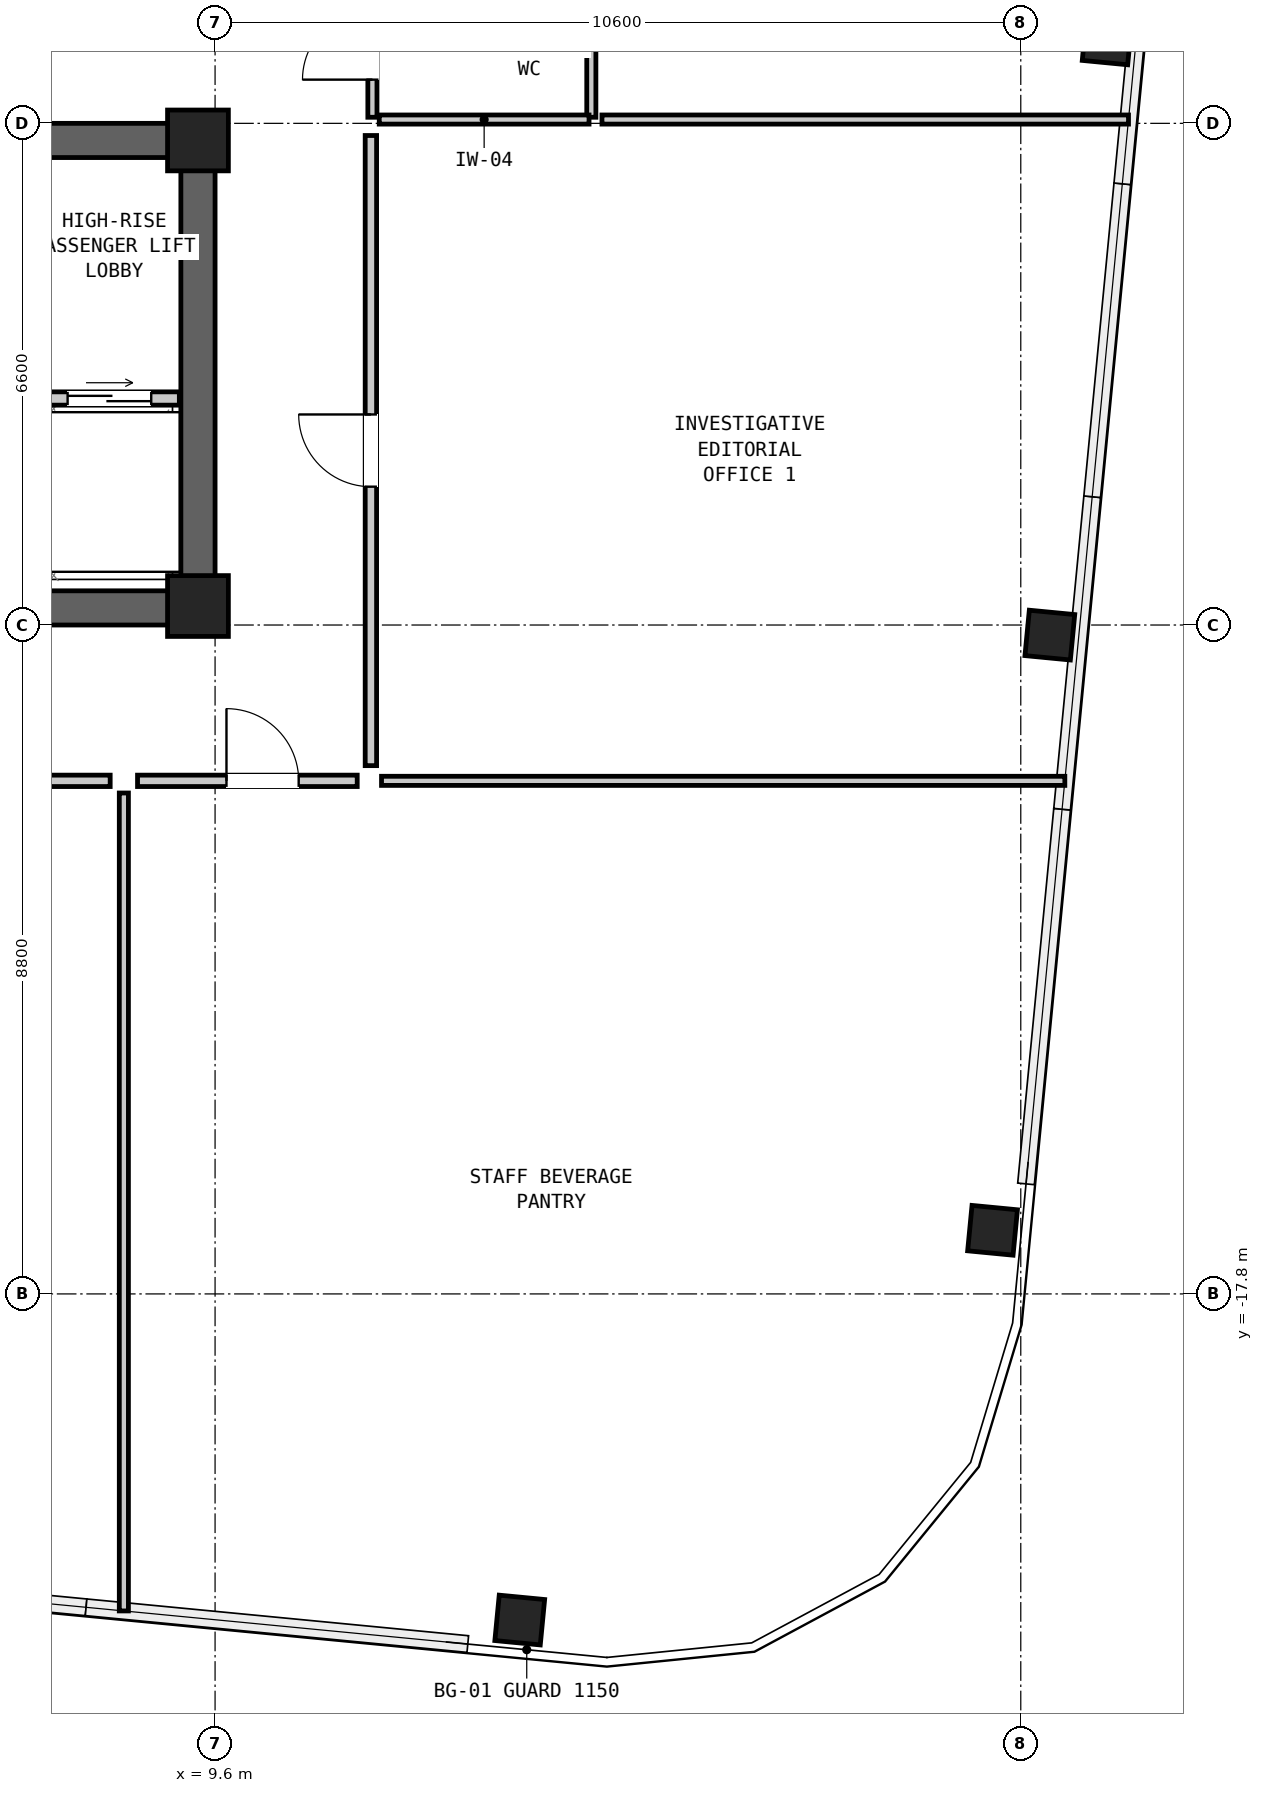
"""IFC4 building model, lengths in metres.
Left out: names, types, materials, properties, quantities, classifications, styles, units other than length and angle.
Written with IfcOpenShell. Run it as: python <this file> out.ifc"""

import sys

from ifc_helpers import new_model, si_unit, direction, frame, frame_2d, origin, origin_2d, place, context, subcontext, project, spatial, rectangle, hollow_rectangle, extrude, element, fill, save


model = new_model("IFC4")
c1 = context("Model", 3, precision=1e-05, world=origin(), true_north=direction((0.0, 1.0)))
c2 = subcontext(c1, "Body", "Model", "MODEL_VIEW")
j1 = project(units=[si_unit("LENGTHUNIT", "METRE"), si_unit("PLANEANGLEUNIT", "RADIAN")], contexts=[c1])
p1 = place(None, origin())
s1 = spatial("IfcSite", under=j1, at=p1, CompositionType="ELEMENT")
p2 = place(p1, origin())
s2 = spatial("IfcBuilding", under=s1, at=p2, CompositionType="ELEMENT")
p3 = place(p2, frame((0.0, 0.0, 252.0)))
s3 = spatial("IfcBuildingStorey", under=s2, at=p3, CompositionType="ELEMENT", Elevation=252.0)
p4 = place(p3, frame((-9.6, -8.775, 0.0), z_axis=(0.0, 0.0, 1.0), x_axis=(1.0, 0.0, 0.0)))
e1 = element("IfcWall", 1, at=p4, inside=s3, PredefinedType="SHEAR", context=c2, shape_type="SweptSolid", body=[
    extrude(rectangle(XDim=19.2, YDim=0.45, at=frame_2d((9.6, 0.0))), origin(), (0.0, 0.0, 1.0), 3.05),
])
p5 = place(p3, frame((-9.6, -2.625, 0.0), z_axis=(0.0, 0.0, 1.0), x_axis=(1.0, 0.0, 0.0)))
e2 = element("IfcWall", 2, at=p5, inside=s3, PredefinedType="SHEAR", context=c2, shape_type="SweptSolid", body=[
    extrude(rectangle(XDim=19.2, YDim=0.45, at=frame_2d((9.6, 0.0))), origin(), (0.0, 0.0, 1.0), 3.05),
])
p6 = place(p5, frame((3.8, 0.0, 0.0)))
e3 = element("IfcOpeningElement", 3, at=p6, cuts=e2, PredefinedType="OPENING", context=c2, shape_type="SweptSolid", body=[
    extrude(rectangle(XDim=1.1, YDim=2.08, at=frame_2d((0.55, 1.04))), frame((0.0, 0.237, 0.0), z_axis=(0.0, -1.0, 0.0), x_axis=(1.0, 0.0, 0.0)), (0.0, 0.0, 1.0), 0.474),
])
p7 = place(p5, frame((10.8, 0.0, 0.0)))
e4 = element("IfcOpeningElement", 4, at=p7, cuts=e2, PredefinedType="OPENING", context=c2, shape_type="SweptSolid", body=[
    extrude(rectangle(XDim=0.95, YDim=2.1, at=frame_2d((0.475, 1.05))), frame((0.0, 0.237, 0.0), z_axis=(0.0, -1.0, 0.0), x_axis=(1.0, 0.0, 0.0)), (0.0, 0.0, 1.0), 0.474),
])
p8 = place(p5, frame((14.8, 0.0, 0.0)))
e5 = element("IfcOpeningElement", 5, at=p8, cuts=e2, PredefinedType="OPENING", context=c2, shape_type="SweptSolid", body=[
    extrude(rectangle(XDim=1.6, YDim=2.12, at=frame_2d((0.8, 1.06))), frame((0.0, 0.237, 0.0), z_axis=(0.0, -1.0, 0.0), x_axis=(1.0, 0.0, 0.0)), (0.0, 0.0, 1.0), 0.474),
])
p9 = place(p3, frame((9.375, -9.0, 0.0), z_axis=(0.0, 0.0, 1.0), x_axis=(0.0, 1.0, 0.0)))
e6 = element("IfcWall", 6, at=p9, inside=s3, PredefinedType="SHEAR", context=c2, shape_type="SweptSolid", body=[
    extrude(rectangle(XDim=6.6, YDim=0.45, at=frame_2d((3.3, 0.0))), origin(), (0.0, 0.0, 1.0), 3.05),
])
for number, where, z_axis, x_axis in (
    (7, (13.608, -22.09, 0.0), (0.0, 0.0, 1.0), (0.995, -0.096, 0.0)),
    (8, (19.829, -16.963, 0.0), (0.0, 0.0, 1.0), (0.096, 0.995, 0.0)),
    (9, (20.583, -9.133, 0.0), (0.0, 0.0, 1.0), (0.096, 0.995, 0.0)),
    (10, (21.336, -1.302, 0.0), (0.0, 0.0, 1.0), (0.096, 0.995, 0.0)),
):
    element("IfcColumn", number, at=place(p3, frame(where, z_axis=z_axis, x_axis=x_axis)), inside=s3, PredefinedType="COLUMN", context=c2, shape_type="SweptSolid", body=[
        extrude(hollow_rectangle(XDim=0.6, YDim=0.6, WallThickness=0.04, at=origin_2d()), origin(), (0.0, 0.0, 1.0), 3.05),
    ])
for number, where, z_axis, x_axis in (
    (11, (9.375, -2.625, 0.0), (0.0, 0.0, 1.0), (1.0, 0.0, 0.0)),
    (12, (9.375, -8.75, 0.0), (0.0, 0.0, 1.0), (1.0, 0.0, 0.0)),
):
    element("IfcColumn", number, at=place(p3, frame(where, z_axis=z_axis, x_axis=x_axis)), inside=s3, PredefinedType="COLUMN", context=c2, shape_type="SweptSolid", body=[
        extrude(rectangle(XDim=0.8, YDim=0.8, at=origin_2d()), origin(), (0.0, 0.0, 1.0), 3.05),
    ])
p10 = place(p3, frame((4.0, -6.02, 0.0), z_axis=(0.0, 0.0, 1.0), x_axis=(1.0, 0.0, 0.0)))
e13 = element("IfcWall", 13, at=p10, inside=s3, PredefinedType="PARTITIONING", context=c2, shape_type="SweptSolid", body=[
    extrude(rectangle(XDim=5.13, YDim=0.175, at=frame_2d((2.565, 0.0))), origin(), (0.0, 0.0, 1.0), 2.86),
])
p11 = place(p10, frame((0.22, 0.0, 0.0)))
e14 = element("IfcOpeningElement", 14, at=p11, cuts=e13, PredefinedType="OPENING", context=c2, shape_type="SweptSolid", body=[
    extrude(rectangle(XDim=1.1, YDim=2.06, at=frame_2d((0.55, 1.03))), frame((0.0, 0.1, 0.0), z_axis=(0.0, -1.0, 0.0), x_axis=(1.0, 0.0, 0.0)), (0.0, 0.0, 1.0), 0.199),
])
p12 = place(p10, frame((1.94, 0.0, 0.0)))
e15 = element("IfcOpeningElement", 15, at=p12, cuts=e13, PredefinedType="OPENING", context=c2, shape_type="SweptSolid", body=[
    extrude(rectangle(XDim=1.1, YDim=2.06, at=frame_2d((0.55, 1.03))), frame((0.0, 0.1, 0.0), z_axis=(0.0, -1.0, 0.0), x_axis=(1.0, 0.0, 0.0)), (0.0, 0.0, 1.0), 0.199),
])
p13 = place(p10, frame((3.66, 0.0, 0.0)))
e16 = element("IfcOpeningElement", 16, at=p13, cuts=e13, PredefinedType="OPENING", context=c2, shape_type="SweptSolid", body=[
    extrude(rectangle(XDim=1.1, YDim=2.06, at=frame_2d((0.55, 1.03))), frame((0.0, 0.1, 0.0), z_axis=(0.0, -1.0, 0.0), x_axis=(1.0, 0.0, 0.0)), (0.0, 0.0, 1.0), 0.199),
])
p14 = place(p3, frame((11.67, -2.32, 0.0), z_axis=(0.0, 0.0, 1.0), x_axis=(0.0, 1.0, 0.0)))
e17 = element("IfcWall", 17, at=p14, inside=s3, PredefinedType="PARTITIONING", context=c2, shape_type="SweptSolid", body=[
    extrude(rectangle(XDim=1.94, YDim=0.12, at=frame_2d((0.97, 0.0))), origin(), (0.0, 0.0, 1.0), 2.86),
])
p15 = place(p14, frame((0.495, 0.0, 0.0)))
e18 = element("IfcOpeningElement", 18, at=p15, cuts=e17, PredefinedType="OPENING", context=c2, shape_type="SweptSolid", body=[
    extrude(rectangle(XDim=0.92, YDim=2.1, at=frame_2d((0.46, 1.05))), frame((0.0, 0.072, 0.0), z_axis=(0.0, -1.0, 0.0), x_axis=(1.0, 0.0, 0.0)), (0.0, 0.0, 1.0), 0.144),
])
p16 = place(p3, frame((14.55, -2.32, 0.0), z_axis=(0.0, 0.0, 1.0), x_axis=(0.0, 1.0, 0.0)))
e19 = element("IfcWall", 19, at=p16, inside=s3, PredefinedType="PARTITIONING", context=c2, shape_type="SweptSolid", body=[
    extrude(rectangle(XDim=5.93, YDim=0.12, at=frame_2d((2.965, 0.0))), origin(), (0.0, 0.0, 1.0), 2.86),
])
p17 = place(p3, frame((11.76, -2.35, 0.0), z_axis=(0.0, 0.0, 1.0), x_axis=(1.0, 0.0, 0.0)))
e20 = element("IfcWall", 20, at=p17, inside=s3, PredefinedType="PARTITIONING", context=c2, shape_type="SweptSolid", body=[
    extrude(rectangle(XDim=2.76, YDim=0.12, at=frame_2d((1.38, 0.0))), origin(), (0.0, 0.0, 1.0), 1.981),
])
p18 = place(p3, frame((11.79, -11.05, 0.0), z_axis=(0.0, 0.0, 1.0), x_axis=(1.0, 0.0, 0.0)))
e21 = element("IfcWall", 21, at=p18, inside=s3, PredefinedType="PARTITIONING", context=c2, shape_type="SweptSolid", body=[
    extrude(rectangle(XDim=8.99, YDim=0.12, at=frame_2d((4.495, 0.0))), origin(), (0.0, 0.0, 1.0), 2.86),
])
p19 = place(p3, frame((8.4, -21.971, 0.0), z_axis=(0.0, 0.0, 1.0), x_axis=(0.0, 1.0, 0.0)))
e22 = element("IfcWall", 22, at=p19, inside=s3, PredefinedType="PARTITIONING", context=c2, shape_type="SweptSolid", body=[
    extrude(rectangle(XDim=10.761, YDim=0.12, at=frame_2d((5.38, 0.0))), origin(), (0.0, 0.0, 1.0), 2.86),
])
p20 = place(p3, frame((14.69, -2.35, 0.0), z_axis=(0.0, 0.0, 1.0), x_axis=(1.0, 0.0, 0.0)))
e23 = element("IfcWall", 23, at=p20, inside=s3, PredefinedType="PARTITIONING", context=c2, shape_type="SweptSolid", body=[
    extrude(rectangle(XDim=6.927, YDim=0.12, at=frame_2d((3.464, 0.0))), origin(), (0.0, 0.0, 1.0), 1.981),
])
p21 = place(p3, frame((3.58, -11.05, 0.0), z_axis=(0.0, 0.0, 1.0), x_axis=(1.0, 0.0, 0.0)))
e24 = element("IfcWall", 24, at=p21, inside=s3, PredefinedType="PARTITIONING", context=c2, shape_type="SweptSolid", body=[
    extrude(rectangle(XDim=4.64, YDim=0.15, at=frame_2d((2.32, 0.0))), origin(), (0.0, 0.0, 1.0), 2.86),
])
p22 = place(p21, frame((1.845, 0.0, 0.0)))
e25 = element("IfcOpeningElement", 25, at=p22, cuts=e24, PredefinedType="OPENING", context=c2, shape_type="SweptSolid", body=[
    extrude(rectangle(XDim=0.95, YDim=2.1, at=frame_2d((0.475, 1.05))), frame((0.0, 0.087, 0.0), z_axis=(0.0, -1.0, 0.0), x_axis=(1.0, 0.0, 0.0)), (0.0, 0.0, 1.0), 0.174),
])
p23 = place(p3, frame((8.58, -11.05, 0.0), z_axis=(0.0, 0.0, 1.0), x_axis=(1.0, 0.0, 0.0)))
e26 = element("IfcWall", 26, at=p23, inside=s3, PredefinedType="PARTITIONING", context=c2, shape_type="SweptSolid", body=[
    extrude(rectangle(XDim=2.89, YDim=0.15, at=frame_2d((1.445, 0.0))), origin(), (0.0, 0.0, 1.0), 2.86),
])
p24 = place(p23, frame((1.17, 0.0, 0.0)))
e27 = element("IfcOpeningElement", 27, at=p24, cuts=e26, PredefinedType="OPENING", context=c2, shape_type="SweptSolid", body=[
    extrude(rectangle(XDim=0.95, YDim=2.1, at=frame_2d((0.475, 1.05))), frame((0.0, 0.087, 0.0), z_axis=(0.0, -1.0, 0.0), x_axis=(1.0, 0.0, 0.0)), (0.0, 0.0, 1.0), 0.174),
])
p25 = place(p3, frame((11.65, -10.85, 0.0), z_axis=(0.0, 0.0, 1.0), x_axis=(0.0, 1.0, 0.0)))
e28 = element("IfcWall", 28, at=p25, inside=s3, PredefinedType="PARTITIONING", context=c2, shape_type="SweptSolid", body=[
    extrude(rectangle(XDim=8.29, YDim=0.15, at=frame_2d((4.145, 0.0))), origin(), (0.0, 0.0, 1.0), 2.86),
])
p26 = place(p25, frame((3.67, 0.0, 0.0)))
e29 = element("IfcOpeningElement", 29, at=p26, cuts=e28, PredefinedType="OPENING", context=c2, shape_type="SweptSolid", body=[
    extrude(rectangle(XDim=0.95, YDim=2.1, at=frame_2d((0.475, 1.05))), frame((0.0, 0.087, 0.0), z_axis=(0.0, -1.0, 0.0), x_axis=(1.0, 0.0, 0.0)), (0.0, 0.0, 1.0), 0.174),
])
p27 = place(p13, origin())
e30 = element("IfcDoor", 30, at=p27, inside=s3, OperationType="DOUBLE_DOOR_SLIDING", PredefinedType="DOOR", context=c2, shape_type="SweptSolid", body=[
    extrude(rectangle(XDim=1.1, YDim=2.06, at=frame_2d((0.55, 1.03))), frame((0.0, 0.025, 0.0), z_axis=(0.0, -1.0, 0.0), x_axis=(1.0, 0.0, 0.0)), (0.0, 0.0, 1.0), 0.05),
])
fill(e16, e30)
p28 = place(p15, origin())
e31 = element("IfcDoor", 31, at=p28, inside=s3, OperationType="SINGLE_SWING_LEFT", PredefinedType="DOOR", context=c2, shape_type="SweptSolid", body=[
    extrude(rectangle(XDim=0.92, YDim=2.1, at=frame_2d((0.46, 1.05))), frame((0.0, 0.025, 0.0), z_axis=(0.0, -1.0, 0.0), x_axis=(1.0, 0.0, 0.0)), (0.0, 0.0, 1.0), 0.05),
])
fill(e18, e31)
p29 = place(p24, origin())
e32 = element("IfcDoor", 32, at=p29, inside=s3, OperationType="SINGLE_SWING_LEFT", PredefinedType="DOOR", context=c2, shape_type="SweptSolid", body=[
    extrude(rectangle(XDim=0.95, YDim=2.1, at=frame_2d((0.475, 1.05))), frame((0.0, 0.025, 0.0), z_axis=(0.0, -1.0, 0.0), x_axis=(1.0, 0.0, 0.0)), (0.0, 0.0, 1.0), 0.05),
])
fill(e27, e32)
p30 = place(p26, origin())
e33 = element("IfcDoor", 33, at=p30, inside=s3, OperationType="SINGLE_SWING_RIGHT", PredefinedType="DOOR", context=c2, shape_type="SweptSolid", body=[
    extrude(rectangle(XDim=0.95, YDim=2.1, at=frame_2d((0.475, 1.05))), frame((0.0, 0.025, 0.0), z_axis=(0.0, -1.0, 0.0), x_axis=(1.0, 0.0, 0.0)), (0.0, 0.0, 1.0), 0.05),
])
fill(e29, e33)
save(model, sys.argv[1])
